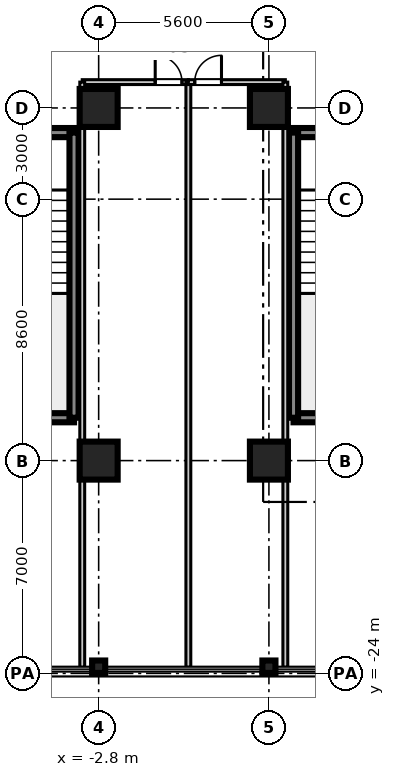
"""IFC4 building model, lengths in metres.
Left out: names, types, materials, properties, quantities, classifications, styles, units other than length and angle.
Written with IfcOpenShell. Run it as: python <this file> out.ifc"""

import sys

from ifc_helpers import new_model, si_unit, direction, frame, frame_2d, origin, origin_2d, place, context, subcontext, project, spatial, rectangle, i_section, extrude, source, transform, mapped, element, fill, save


model = new_model("IFC4")
c1 = context("Model", 3, precision=1e-05, world=origin(), true_north=direction((0.0, 1.0)))
c2 = subcontext(c1, "Body", "Model", "MODEL_VIEW")
j1 = project(units=[si_unit("LENGTHUNIT", "METRE"), si_unit("PLANEANGLEUNIT", "RADIAN")], contexts=[c1])
p1 = place(None, origin())
s1 = spatial("IfcSite", under=j1, at=p1, CompositionType="ELEMENT")
p2 = place(p1, origin())
s2 = spatial("IfcBuilding", under=s1, at=p2, CompositionType="ELEMENT")
p3 = place(p2, frame((0.0, 0.0, 132.1)))
s3 = spatial("IfcBuildingStorey", under=s2, at=p3, CompositionType="ELEMENT", Elevation=132.1)
m1 = source(origin(), c2, "Body", "SweptSolid", [
    extrude(rectangle(XDim=1.25, YDim=1.25, at=origin_2d()), origin(), (0.0, 0.0, 1.0), 3.605),
])
for number, where, z_axis, x_axis in (
    (1, (-2.8, -17.0, 0.0), (0.0, 0.0, 1.0), (1.0, 0.0, 0.0)),
    (2, (-2.8, -5.4, 0.0), (0.0, 0.0, 1.0), (1.0, 0.0, 0.0)),
    (3, (2.8, -17.0, 0.0), (0.0, 0.0, 1.0), (1.0, 0.0, 0.0)),
    (4, (2.8, -5.4, 0.0), (0.0, 0.0, 1.0), (1.0, 0.0, 0.0)),
):
    element("IfcColumn", number, at=place(p3, frame(where, z_axis=z_axis, x_axis=x_axis)), inside=s3, PredefinedType="COLUMN", context=c2, shape_type="MappedRepresentation", body=[
        mapped(m1, transform((0.0, 0.0, 0.0), scale=1.0)),
    ])
m2 = source(origin(), c2, "Body", "SweptSolid", [
    extrude(i_section(OverallWidth=0.409, OverallDepth=0.43, WebThickness=0.021, FlangeThickness=0.034, at=origin_2d()), origin(), (0.0, 0.0, 1.0), 3.605),
])
for number, where, z_axis, x_axis in (
    (5, (-2.8, -23.78, 0.0), (0.0, 0.0, 1.0), (0.0, 1.0, 0.0)),
    (6, (2.8, -23.78, 0.0), (0.0, 0.0, 1.0), (0.0, 1.0, 0.0)),
):
    element("IfcColumn", number, at=place(p3, frame(where, z_axis=z_axis, x_axis=x_axis)), inside=s3, PredefinedType="COLUMN", context=c2, shape_type="MappedRepresentation", body=[
        mapped(m2, transform((0.0, 0.0, 0.0), scale=1.0)),
    ])
m3 = source(origin(), c2, "Body", "SweptSolid", [
    extrude(rectangle(XDim=3.98, YDim=0.3, at=frame_2d((1.99, 0.0))), origin(), (0.0, 0.0, 1.0), 3.38),
])
for number, where, z_axis, x_axis in (
    (7, (3.61, -15.59, 0.0), (0.0, 0.0, 1.0), (1.0, 0.0, 0.0)),
    (8, (3.61, -6.21, 0.0), (0.0, 0.0, 1.0), (1.0, 0.0, 0.0)),
):
    element("IfcWall", number, at=place(p3, frame(where, z_axis=z_axis, x_axis=x_axis)), inside=s3, PredefinedType="SHEAR", context=c2, shape_type="MappedRepresentation", body=[
        mapped(m3, transform((0.0, 0.0, 0.0), scale=1.0)),
    ])
m4 = source(origin(), c2, "Body", "SweptSolid", [
    extrude(rectangle(XDim=9.38, YDim=0.3, at=frame_2d((4.69, 0.0))), origin(), (0.0, 0.0, 1.0), 3.38),
])
p4 = place(p3, frame((3.61, -15.59, 0.0), z_axis=(0.0, 0.0, 1.0), x_axis=(0.0, 1.0, 0.0)))
e9 = element("IfcWall", 9, at=p4, inside=s3, PredefinedType="SHEAR", context=c2, shape_type="MappedRepresentation", body=[
    mapped(m4, transform((0.0, 0.0, 0.0), scale=1.0)),
])
p5 = place(p3, frame((-7.59, -15.59, 0.0), z_axis=(0.0, 0.0, 1.0), x_axis=(1.0, 0.0, 0.0)))
e10 = element("IfcWall", 10, at=p5, inside=s3, PredefinedType="SHEAR", context=c2, shape_type="MappedRepresentation", body=[
    mapped(m3, transform((0.0, 0.0, 0.0), scale=1.0)),
])
p6 = place(p3, frame((-7.59, -6.21, 0.0), z_axis=(0.0, 0.0, 1.0), x_axis=(1.0, 0.0, 0.0)))
e11 = element("IfcWall", 11, at=p6, inside=s3, PredefinedType="SHEAR", context=c2, shape_type="MappedRepresentation", body=[
    mapped(m3, transform((0.0, 0.0, 0.0), scale=1.0)),
])
p7 = place(p6, frame((1.44, 0.0, 0.0)))
e12 = element("IfcOpeningElement", 12, at=p7, cuts=e11, PredefinedType="OPENING", context=c2, shape_type="SweptSolid", body=[
    extrude(rectangle(XDim=1.1, YDim=2.15, at=frame_2d((0.55, 1.075))), frame((0.0, 0.16, 0.0), z_axis=(0.0, -1.0, 0.0), x_axis=(1.0, 0.0, 0.0)), (0.0, 0.0, 1.0), 0.32),
])
p8 = place(p3, frame((-3.61, -15.59, 0.0), z_axis=(0.0, 0.0, 1.0), x_axis=(0.0, 1.0, 0.0)))
e13 = element("IfcWall", 13, at=p8, inside=s3, PredefinedType="SHEAR", context=c2, shape_type="MappedRepresentation", body=[
    mapped(m4, transform((0.0, 0.0, 0.0), scale=1.0)),
])
m5 = source(origin(), c2, "Body", "SweptSolid", [
    extrude(rectangle(XDim=3.49, YDim=0.16, at=frame_2d((1.745, 0.0))), origin(), (0.0, 0.0, 1.0), 2.72),
])
p9 = place(p3, frame((-3.34, -4.55, 0.0), z_axis=(0.0, 0.0, 1.0), x_axis=(1.0, 0.0, 0.0)))
e14 = element("IfcWall", 14, at=p9, inside=s3, PredefinedType="PARTITIONING", context=c2, shape_type="MappedRepresentation", body=[
    mapped(m5, transform((0.0, 0.0, 0.0), scale=1.0)),
])
p10 = place(p9, frame((2.4, 0.0, 0.0)))
e15 = element("IfcOpeningElement", 15, at=p10, cuts=e14, PredefinedType="OPENING", context=c2, shape_type="SweptSolid", body=[
    extrude(rectangle(XDim=0.88, YDim=2.1, at=frame_2d((0.44, 1.05))), frame((0.0, 0.09, 0.0), z_axis=(0.0, -1.0, 0.0), x_axis=(1.0, 0.0, 0.0)), (0.0, 0.0, 1.0), 0.18),
])
m6 = source(origin(), c2, "Body", "SweptSolid", [
    extrude(rectangle(XDim=19.25, YDim=0.16, at=frame_2d((9.625, 0.0))), origin(), (0.0, 0.0, 1.0), 2.72),
])
for number, where, z_axis, x_axis in (
    (16, (-3.34, -23.8, 0.0), (0.0, 0.0, 1.0), (0.0, 1.0, 0.0)),
    (17, (0.15, -23.8, 0.0), (0.0, 0.0, 1.0), (0.0, 1.0, 0.0)),
):
    element("IfcWall", number, at=place(p3, frame(where, z_axis=z_axis, x_axis=x_axis)), inside=s3, PredefinedType="PARTITIONING", context=c2, shape_type="MappedRepresentation", body=[
        mapped(m6, transform((0.0, 0.0, 0.0), scale=1.0)),
    ])
m7 = source(origin(), c2, "Body", "SweptSolid", [
    extrude(rectangle(XDim=3.19, YDim=0.16, at=frame_2d((1.595, 0.0))), origin(), (0.0, 0.0, 1.0), 2.72),
])
p11 = place(p3, frame((0.15, -4.55, 0.0), z_axis=(0.0, 0.0, 1.0), x_axis=(1.0, 0.0, 0.0)))
e18 = element("IfcWall", 18, at=p11, inside=s3, PredefinedType="PARTITIONING", context=c2, shape_type="MappedRepresentation", body=[
    mapped(m7, transform((0.0, 0.0, 0.0), scale=1.0)),
])
p12 = place(p11, frame((0.21, 0.0, 0.0)))
e19 = element("IfcOpeningElement", 19, at=p12, cuts=e18, PredefinedType="OPENING", context=c2, shape_type="SweptSolid", body=[
    extrude(rectangle(XDim=0.88, YDim=2.1, at=frame_2d((0.44, 1.05))), frame((0.0, 0.09, 0.0), z_axis=(0.0, -1.0, 0.0), x_axis=(1.0, 0.0, 0.0)), (0.0, 0.0, 1.0), 0.18),
])
p13 = place(p3, frame((3.34, -23.8, 0.0), z_axis=(0.0, 0.0, 1.0), x_axis=(0.0, 1.0, 0.0)))
e20 = element("IfcWall", 20, at=p13, inside=s3, PredefinedType="PARTITIONING", context=c2, shape_type="MappedRepresentation", body=[
    mapped(m6, transform((0.0, 0.0, 0.0), scale=1.0)),
])
m8 = source(origin(), c2, "Body", "SweptSolid", [
    extrude(rectangle(XDim=0.88, YDim=2.1, at=frame_2d((0.44, 1.05))), frame((0.0, 0.025, 0.0), z_axis=(0.0, -1.0, 0.0), x_axis=(1.0, 0.0, 0.0)), (0.0, 0.0, 1.0), 0.05),
])
p14 = place(p10, frame((0.88, 0.0, 0.0), z_axis=(0.0, 0.0, 1.0), x_axis=(-1.0, 0.0, 0.0)))
e21 = element("IfcDoor", 21, at=p14, inside=s3, OperationType="SINGLE_SWING_LEFT", PredefinedType="DOOR", context=c2, shape_type="MappedRepresentation", body=[
    mapped(m8, transform((0.0, 0.0, 0.0), scale=1.0)),
])
fill(e15, e21)
p15 = place(p12, frame((0.88, 0.0, 0.0), z_axis=(0.0, 0.0, 1.0), x_axis=(-1.0, 0.0, 0.0)))
e22 = element("IfcDoor", 22, at=p15, inside=s3, OperationType="SINGLE_SWING_RIGHT", PredefinedType="DOOR", context=c2, shape_type="MappedRepresentation", body=[
    mapped(m8, transform((0.0, 0.0, 0.0), scale=1.0)),
])
fill(e19, e22)
save(model, sys.argv[1])
